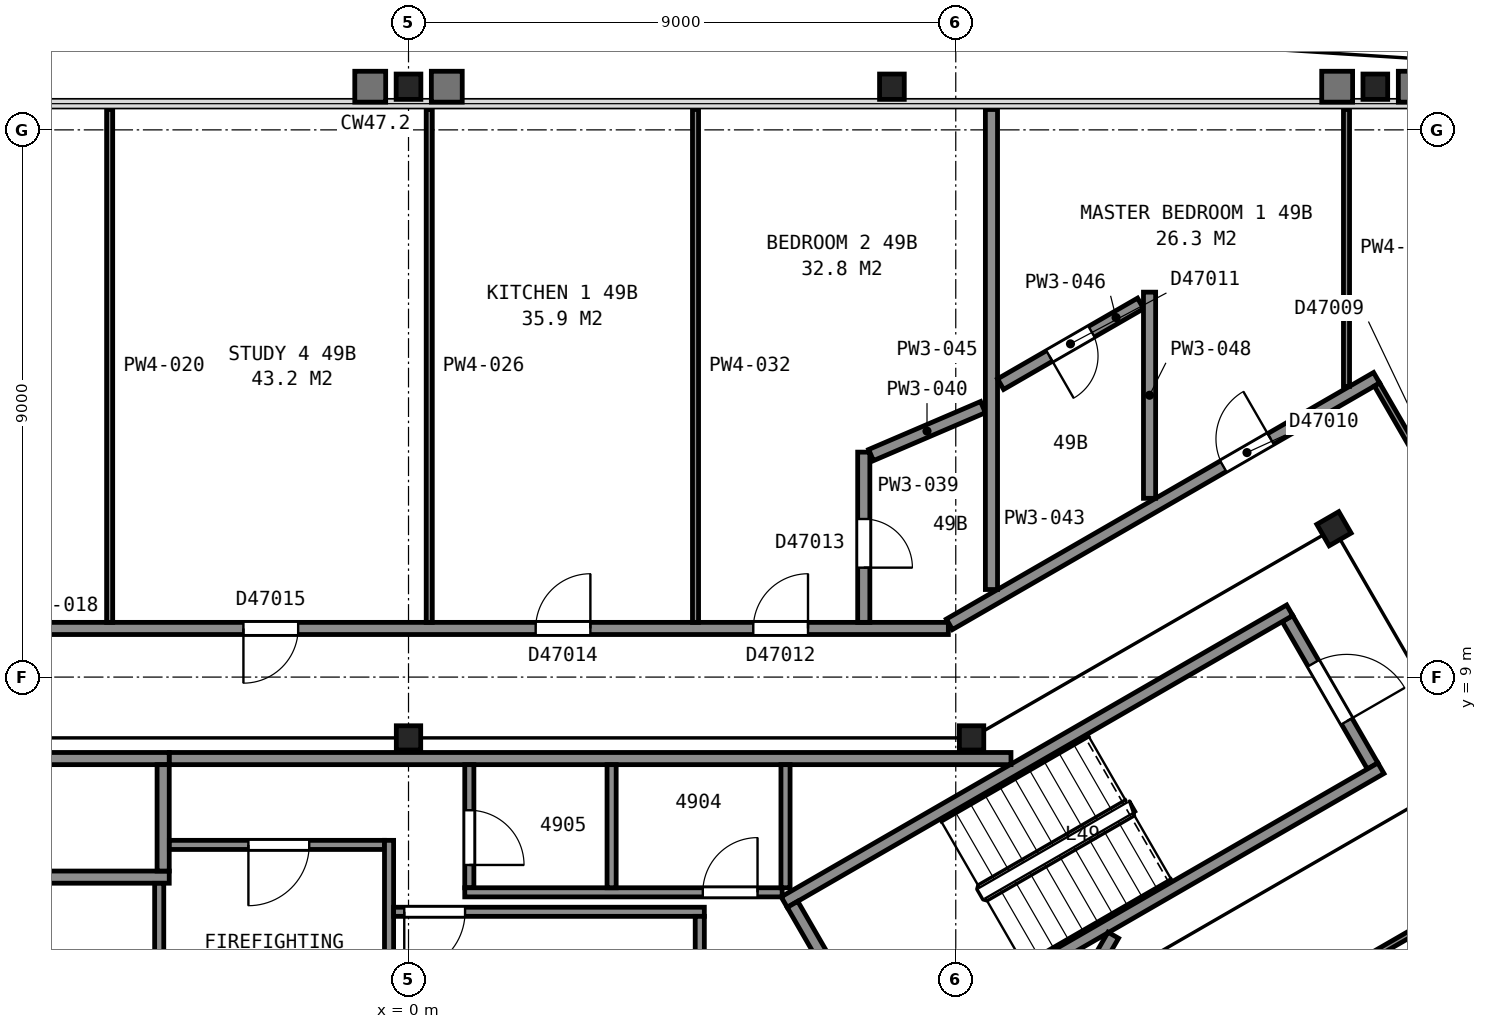
"""IFC4 building model, lengths in metres.
Left out: names, types, materials, properties, quantities, classifications, styles, units other than length and angle.
Written with IfcOpenShell. Run it as: python <this file> out.ifc"""

import sys

from ifc_helpers import new_model, si_unit, direction, frame, frame_2d, origin, origin_2d, place, context, subcontext, project, spatial, rectangle, i_section, extrude, element, fill, save


model = new_model("IFC4")
c1 = context("Model", 3, precision=1e-05, world=origin(), true_north=direction((0.0, 1.0)))
c2 = subcontext(c1, "Body", "Model", "MODEL_VIEW")
j1 = project(units=[si_unit("LENGTHUNIT", "METRE"), si_unit("PLANEANGLEUNIT", "RADIAN")], contexts=[c1])
p1 = place(None, origin())
s1 = spatial("IfcSite", under=j1, at=p1, CompositionType="ELEMENT")
p2 = place(p1, origin())
s2 = spatial("IfcBuilding", under=s1, at=p2, CompositionType="ELEMENT")
p3 = place(p2, frame((0.0, 0.0, 196.9)))
s3 = spatial("IfcBuildingStorey", under=s2, at=p3, CompositionType="ELEMENT", Elevation=196.9)
for number, where, z_axis, x_axis in (
    (1, (15.9, 18.71, 0.0), (0.0, 0.0, 1.0), (1.0, 0.0, 0.0)),
    (2, (7.95, 18.71, 0.0), (0.0, 0.0, 1.0), (1.0, 0.0, 0.0)),
    (3, (0.0, 18.71, 0.0), (0.0, 0.0, 1.0), (1.0, 0.0, 0.0)),
):
    element("IfcColumn", number, at=place(p3, frame(where, z_axis=z_axis, x_axis=x_axis)), inside=s3, PredefinedType="COLUMN", context=c2, shape_type="SweptSolid", body=[
        extrude(i_section(OverallWidth=0.406, OverallDepth=0.417, WebThickness=0.03, FlangeThickness=0.048, FilletRadius=0.015, at=origin_2d()), origin(), (0.0, 0.0, 1.0), 3.01),
    ])
p4 = place(p3, frame((15.22, 11.44, 0.0), z_axis=(0.0, 0.0, 1.0), x_axis=(0.5, -0.866025403784, 0.0)))
e4 = element("IfcColumn", 4, at=p4, inside=s3, PredefinedType="COLUMN", context=c2, shape_type="SweptSolid", body=[
    extrude(i_section(OverallWidth=0.406, OverallDepth=0.417, WebThickness=0.03, FlangeThickness=0.048, FilletRadius=0.015, at=origin_2d()), origin(), (0.0, 0.0, 1.0), 3.7),
])
for number, where, z_axis, x_axis in (
    (5, (9.26, 8.0, 0.0), (0.0, 0.0, 1.0), (1.0, 0.0, 0.0)),
    (6, (0.0, 8.0, 0.0), (0.0, 0.0, 1.0), (1.0, 0.0, 0.0)),
):
    element("IfcColumn", number, at=place(p3, frame(where, z_axis=z_axis, x_axis=x_axis)), inside=s3, PredefinedType="COLUMN", context=c2, shape_type="SweptSolid", body=[
        extrude(i_section(OverallWidth=0.401, OverallDepth=0.399, WebThickness=0.025, FlangeThickness=0.04, FilletRadius=0.015, at=origin_2d()), origin(), (0.0, 0.0, 1.0), 3.7),
    ])
p5 = place(p3, frame((15.855, 7.538, 0.0), z_axis=(0.0, 0.0, 1.0), x_axis=(-0.500049511043, 0.865996816683, 0.0)))
e7 = element("IfcWall", 7, at=p5, inside=s3, PredefinedType="PARTITIONING", context=c2, shape_type="SweptSolid", body=[
    extrude(rectangle(XDim=2.8, YDim=0.2, at=frame_2d((1.4, 0.0))), origin(), (0.0, 0.0, 1.0), 3.45),
])
p6 = place(p5, frame((0.85, 0.0, 0.0)))
e8 = element("IfcOpeningElement", 8, at=p6, cuts=e7, PredefinedType="OPENING", context=c2, shape_type="SweptSolid", body=[
    extrude(rectangle(XDim=1.1, YDim=2.1, at=frame_2d((0.55, 1.05))), frame((0.0, 0.11, 0.0), z_axis=(0.0, -1.0, 0.0), x_axis=(1.0, 0.0, 0.0)), (0.0, 0.0, 1.0), 0.22),
])
for number, where, z_axis, x_axis in (
    (9, (6.178, 5.299, 0.0), (0.0, 0.0, 1.0), (0.866, 0.5, 0.0)),
    (10, (7.678, 2.701, 0.0), (0.0, 0.0, 1.0), (0.866, 0.5, 0.0)),
):
    element("IfcWall", number, at=place(p3, frame(where, z_axis=z_axis, x_axis=x_axis)), inside=s3, PredefinedType="PARTITIONING", context=c2, shape_type="SweptSolid", body=[
        extrude(rectangle(XDim=9.6, YDim=0.2, at=frame_2d((4.8, 0.0))), origin(), (0.0, 0.0, 1.0), 3.45),
    ])
p7 = place(p3, frame((7.715, 2.838, 0.0), z_axis=(0.0, 0.0, 1.0), x_axis=(-0.500049511043, 0.865996816683, 0.0)))
e11 = element("IfcWall", 11, at=p7, inside=s3, PredefinedType="PARTITIONING", context=c2, shape_type="SweptSolid", body=[
    extrude(rectangle(XDim=2.8, YDim=0.2, at=frame_2d((1.4, 0.0))), origin(), (0.0, 0.0, 1.0), 3.45),
])
for number, where, z_axis, x_axis in (
    (12, (-6.285, 5.71, 0.0), (0.0, 0.0, 1.0), (1.0, 0.0, 0.0)),
    (13, (-6.285, 7.66, 0.0), (0.0, 0.0, 1.0), (1.0, 0.0, 0.0)),
):
    element("IfcWall", number, at=place(p3, frame(where, z_axis=z_axis, x_axis=x_axis)), inside=s3, PredefinedType="PARTITIONING", context=c2, shape_type="SweptSolid", body=[
        extrude(rectangle(XDim=2.35, YDim=0.2, at=frame_2d((1.175, 0.0))), origin(), (0.0, 0.0, 1.0), 3.7),
    ])
p8 = place(p3, frame((-4.035, 5.81, 0.0), z_axis=(0.0, 0.0, 1.0), x_axis=(0.0, 1.0, 0.0)))
e14 = element("IfcWall", 14, at=p8, inside=s3, PredefinedType="PARTITIONING", context=c2, shape_type="SweptSolid", body=[
    extrude(rectangle(XDim=1.75, YDim=0.2, at=frame_2d((0.875, 0.0))), origin(), (0.0, 0.0, 1.0), 3.7),
])
p9 = place(p3, frame((-4.1, 2.085, 0.0), z_axis=(0.0, 0.0, 1.0), x_axis=(0.0, 1.0, 0.0)))
e15 = element("IfcWall", 15, at=p9, inside=s3, PredefinedType="PARTITIONING", context=c2, shape_type="SweptSolid", body=[
    extrude(rectangle(XDim=3.523, YDim=0.15, at=frame_2d((1.761, 0.0))), origin(), (0.0, 0.0, 1.0), 3.45),
])
p10 = place(p3, frame((-3.933, 6.24, 0.0), z_axis=(0.0, 0.0, 1.0), x_axis=(1.0, 0.0, 0.0)))
e16 = element("IfcWall", 16, at=p10, inside=s3, PredefinedType="PARTITIONING", context=c2, shape_type="SweptSolid", body=[
    extrude(rectangle(XDim=3.538, YDim=0.15, at=frame_2d((1.769, 0.0))), origin(), (0.0, 0.0, 1.0), 3.45),
])
p11 = place(p10, frame((1.3, 0.0, 0.0)))
e17 = element("IfcOpeningElement", 17, at=p11, cuts=e16, PredefinedType="OPENING", context=c2, shape_type="SweptSolid", body=[
    extrude(rectangle(XDim=1.0, YDim=2.1, at=frame_2d((0.5, 1.05))), frame((0.0, 0.085, 0.0), z_axis=(0.0, -1.0, 0.0), x_axis=(1.0, 0.0, 0.0)), (0.0, 0.0, 1.0), 0.17),
])
p12 = place(p3, frame((-3.933, 7.66, 0.0), z_axis=(0.0, 0.0, 1.0), x_axis=(1.0, 0.0, 0.0)))
e18 = element("IfcWall", 18, at=p12, inside=s3, PredefinedType="PARTITIONING", context=c2, shape_type="SweptSolid", body=[
    extrude(rectangle(XDim=13.841, YDim=0.2, at=frame_2d((6.92, 0.0))), origin(), (0.0, 0.0, 1.0), 3.45),
])
p13 = place(p3, frame((-0.32, 2.252, 0.0), z_axis=(0.0, 0.0, 1.0), x_axis=(0.0, 1.0, 0.0)))
e19 = element("IfcWall", 19, at=p13, inside=s3, PredefinedType="PARTITIONING", context=c2, shape_type="SweptSolid", body=[
    extrude(rectangle(XDim=4.063, YDim=0.15, at=frame_2d((2.031, 0.0))), origin(), (0.0, 0.0, 1.0), 3.45),
])
p14 = place(p3, frame((-0.245, 5.14, 0.0), z_axis=(0.0, 0.0, 1.0), x_axis=(1.0, 0.0, 0.0)))
e20 = element("IfcWall", 20, at=p14, inside=s3, PredefinedType="PARTITIONING", context=c2, shape_type="SweptSolid", body=[
    extrude(rectangle(XDim=5.11, YDim=0.15, at=frame_2d((2.555, 0.0))), origin(), (0.0, 0.0, 1.0), 3.45),
])
p15 = place(p14, frame((0.175, 0.0, 0.0)))
e21 = element("IfcOpeningElement", 21, at=p15, cuts=e20, PredefinedType="OPENING", context=c2, shape_type="SweptSolid", body=[
    extrude(rectangle(XDim=1.0, YDim=2.1, at=frame_2d((0.5, 1.05))), frame((0.0, 0.085, 0.0), z_axis=(0.0, -1.0, 0.0), x_axis=(1.0, 0.0, 0.0)), (0.0, 0.0, 1.0), 0.17),
])
p16 = place(p3, frame((1.0, 7.56, 0.0), z_axis=(0.0, 0.0, 1.0), x_axis=(0.0, -1.0, 0.0)))
e22 = element("IfcWall", 22, at=p16, inside=s3, PredefinedType="PARTITIONING", context=c2, shape_type="SweptSolid", body=[
    extrude(rectangle(XDim=2.025, YDim=0.15, at=frame_2d((1.013, 0.0))), origin(), (0.0, 0.0, 1.0), 3.45),
])
p17 = place(p16, frame((0.75, 0.0, 0.0)))
e23 = element("IfcOpeningElement", 23, at=p17, cuts=e22, PredefinedType="OPENING", context=c2, shape_type="SweptSolid", body=[
    extrude(rectangle(XDim=0.9, YDim=2.1, at=frame_2d((0.45, 1.05))), frame((0.0, 0.085, 0.0), z_axis=(0.0, -1.0, 0.0), x_axis=(1.0, 0.0, 0.0)), (0.0, 0.0, 1.0), 0.17),
])
p18 = place(p3, frame((0.925, 5.46, 0.0), z_axis=(0.0, 0.0, 1.0), x_axis=(1.0, 0.0, 0.0)))
e24 = element("IfcWall", 24, at=p18, inside=s3, PredefinedType="PARTITIONING", context=c2, shape_type="SweptSolid", body=[
    extrude(rectangle(XDim=5.22, YDim=0.15, at=frame_2d((2.61, 0.0))), origin(), (0.0, 0.0, 1.0), 3.45),
])
p19 = place(p18, frame((3.915, 0.0, 0.0)))
e25 = element("IfcOpeningElement", 25, at=p19, cuts=e24, PredefinedType="OPENING", context=c2, shape_type="SweptSolid", body=[
    extrude(rectangle(XDim=0.9, YDim=2.1, at=frame_2d((0.45, 1.05))), frame((0.0, 0.085, 0.0), z_axis=(0.0, -1.0, 0.0), x_axis=(1.0, 0.0, 0.0)), (0.0, 0.0, 1.0), 0.17),
])
p20 = place(p3, frame((3.34, 5.535, 0.0), z_axis=(0.0, 0.0, 1.0), x_axis=(0.0, 1.0, 0.0)))
e26 = element("IfcWall", 26, at=p20, inside=s3, PredefinedType="PARTITIONING", context=c2, shape_type="SweptSolid", body=[
    extrude(rectangle(XDim=2.025, YDim=0.15, at=frame_2d((1.013, 0.0))), origin(), (0.0, 0.0, 1.0), 3.45),
])
p21 = place(p3, frame((4.79, 2.085, 0.0), z_axis=(0.0, 0.0, 1.0), x_axis=(0.0, 1.0, 0.0)))
e27 = element("IfcWall", 27, at=p21, inside=s3, PredefinedType="PARTITIONING", context=c2, shape_type="SweptSolid", body=[
    extrude(rectangle(XDim=2.98, YDim=0.15, at=frame_2d((1.49, 0.0))), origin(), (0.0, 0.0, 1.0), 3.45),
])
p22 = place(p3, frame((6.2, 5.535, 0.0), z_axis=(0.0, 0.0, 1.0), x_axis=(0.0, 1.0, 0.0)))
e28 = element("IfcWall", 28, at=p22, inside=s3, PredefinedType="PARTITIONING", context=c2, shape_type="SweptSolid", body=[
    extrude(rectangle(XDim=2.025, YDim=0.15, at=frame_2d((1.013, 0.0))), origin(), (0.0, 0.0, 1.0), 3.45),
])
p23 = place(p3, frame((9.803, 1.658, 0.0), z_axis=(0.0, 0.0, 1.0), x_axis=(0.499943114462, 0.866058244174, 0.0)))
e29 = element("IfcWall", 29, at=p23, inside=s3, PredefinedType="PARTITIONING", context=c2, shape_type="SweptSolid", body=[
    extrude(rectangle(XDim=3.576, YDim=0.2, at=frame_2d((1.788, 0.0))), origin(), (0.0, 0.0, 1.0), 3.45),
])
p24 = place(p3, frame((-8.828, 9.8, 0.0), z_axis=(0.0, 0.0, 1.0), x_axis=(1.0, 0.0, 0.0)))
e30 = element("IfcWall", 30, at=p24, inside=s3, PredefinedType="PARTITIONING", context=c2, shape_type="SweptSolid", body=[
    extrude(rectangle(XDim=17.706, YDim=0.2, at=frame_2d((8.853, 0.0))), origin(), (0.0, 0.0, 1.0), 2.362),
])
p25 = place(p24, frame((14.498, 0.0, 0.0)))
e31 = element("IfcOpeningElement", 31, at=p25, cuts=e30, PredefinedType="OPENING", context=c2, shape_type="SweptSolid", body=[
    extrude(rectangle(XDim=0.9, YDim=2.1, at=frame_2d((0.45, 1.05))), frame((0.0, 0.11, 0.0), z_axis=(0.0, -1.0, 0.0), x_axis=(1.0, 0.0, 0.0)), (0.0, 0.0, 1.0), 0.22),
])
p26 = place(p24, frame((10.919, 0.0, 0.0)))
e32 = element("IfcOpeningElement", 32, at=p26, cuts=e30, PredefinedType="OPENING", context=c2, shape_type="SweptSolid", body=[
    extrude(rectangle(XDim=0.9, YDim=2.1, at=frame_2d((0.45, 1.05))), frame((0.0, 0.11, 0.0), z_axis=(0.0, -1.0, 0.0), x_axis=(1.0, 0.0, 0.0)), (0.0, 0.0, 1.0), 0.22),
])
p27 = place(p24, frame((6.113, 0.0, 0.0)))
e33 = element("IfcOpeningElement", 33, at=p27, cuts=e30, PredefinedType="OPENING", context=c2, shape_type="SweptSolid", body=[
    extrude(rectangle(XDim=0.9, YDim=2.1, at=frame_2d((0.45, 1.05))), frame((0.0, 0.11, 0.0), z_axis=(0.0, -1.0, 0.0), x_axis=(1.0, 0.0, 0.0)), (0.0, 0.0, 1.0), 0.22),
])
for number, where, z_axis, x_axis in (
    (34, (-4.915, 9.9, 0.0), (0.0, 0.0, 1.0), (0.0, 1.0, 0.0)),
    (35, (0.341, 9.9, 0.0), (0.0, 0.0, 1.0), (0.0, 1.0, 0.0)),
    (36, (4.72, 9.9, 0.0), (0.0, 0.0, 1.0), (0.0, 1.0, 0.0)),
):
    element("IfcWall", number, at=place(p3, frame(where, z_axis=z_axis, x_axis=x_axis)), inside=s3, PredefinedType="PARTITIONING", context=c2, shape_type="SweptSolid", body=[
        extrude(rectangle(XDim=8.435, YDim=0.1, at=frame_2d((4.218, 0.0))), origin(), (0.0, 0.0, 1.0), 2.362),
    ])
p28 = place(p3, frame((7.487, 12.7, 0.0), z_axis=(0.0, 0.0, 1.0), x_axis=(0.0, -1.0, 0.0)))
e37 = element("IfcWall", 37, at=p28, inside=s3, PredefinedType="PARTITIONING", context=c2, shape_type="SweptSolid", body=[
    extrude(rectangle(XDim=2.8, YDim=0.2, at=frame_2d((1.4, 0.0))), origin(), (0.0, 0.0, 1.0), 2.362),
])
p29 = place(p28, frame((1.1, 0.0, 0.0)))
e38 = element("IfcOpeningElement", 38, at=p29, cuts=e37, PredefinedType="OPENING", context=c2, shape_type="SweptSolid", body=[
    extrude(rectangle(XDim=0.8, YDim=2.1, at=frame_2d((0.4, 1.05))), frame((0.0, 0.11, 0.0), z_axis=(0.0, -1.0, 0.0), x_axis=(1.0, 0.0, 0.0)), (0.0, 0.0, 1.0), 0.22),
])
p30 = place(p3, frame((7.606, 12.651, 0.0), z_axis=(0.0, 0.0, 1.0), x_axis=(0.919138725477, 0.39393400885, 0.0)))
e39 = element("IfcWall", 39, at=p30, inside=s3, PredefinedType="PARTITIONING", context=c2, shape_type="SweptSolid", body=[
    extrude(rectangle(XDim=2.003, YDim=0.2, at=frame_2d((1.001, 0.0))), origin(), (0.0, 0.0, 1.0), 2.362),
])
p31 = place(p3, frame((8.895, 9.867, 0.0), z_axis=(0.0, 0.0, 1.0), x_axis=(0.866079355551, 0.499906541154, 0.0)))
e40 = element("IfcWall", 40, at=p31, inside=s3, PredefinedType="PARTITIONING", context=c2, shape_type="SweptSolid", body=[
    extrude(rectangle(XDim=8.113, YDim=0.2, at=frame_2d((4.056, 0.0))), origin(), (0.0, 0.0, 1.0), 2.362),
])
p32 = place(p31, frame((5.201, 0.0, 0.0)))
e41 = element("IfcOpeningElement", 41, at=p32, cuts=e40, PredefinedType="OPENING", context=c2, shape_type="SweptSolid", body=[
    extrude(rectangle(XDim=0.9, YDim=2.1, at=frame_2d((0.45, 1.05))), frame((0.0, 0.11, 0.0), z_axis=(0.0, -1.0, 0.0), x_axis=(1.0, 0.0, 0.0)), (0.0, 0.0, 1.0), 0.22),
])
p33 = place(p3, frame((9.587, 10.44, 0.0), z_axis=(0.0, 0.0, 1.0), x_axis=(0.0, 1.0, 0.0)))
e42 = element("IfcWall", 42, at=p33, inside=s3, PredefinedType="PARTITIONING", context=c2, shape_type="SweptSolid", body=[
    extrude(rectangle(XDim=7.895, YDim=0.2, at=frame_2d((3.947, 0.0))), origin(), (0.0, 0.0, 1.0), 2.362),
])
p34 = place(p3, frame((12.04, 15.146, 0.0), z_axis=(0.0, 0.0, 1.0), x_axis=(-0.866206990114, -0.499685351273, 0.0)))
e43 = element("IfcWall", 43, at=p34, inside=s3, PredefinedType="PARTITIONING", context=c2, shape_type="SweptSolid", body=[
    extrude(rectangle(XDim=2.658, YDim=0.2, at=frame_2d((1.329, 0.0))), origin(), (0.0, 0.0, 1.0), 2.362),
])
p35 = place(p34, frame((0.932, 0.0, 0.0)))
e44 = element("IfcOpeningElement", 44, at=p35, cuts=e43, PredefinedType="OPENING", context=c2, shape_type="SweptSolid", body=[
    extrude(rectangle(XDim=0.8, YDim=2.1, at=frame_2d((0.4, 1.05))), frame((0.0, 0.11, 0.0), z_axis=(0.0, -1.0, 0.0), x_axis=(1.0, 0.0, 0.0)), (0.0, 0.0, 1.0), 0.22),
])
p36 = place(p3, frame((12.187, 11.94, 0.0), z_axis=(0.0, 0.0, 1.0), x_axis=(0.0, 1.0, 0.0)))
e45 = element("IfcWall", 45, at=p36, inside=s3, PredefinedType="PARTITIONING", context=c2, shape_type="SweptSolid", body=[
    extrude(rectangle(XDim=3.391, YDim=0.2, at=frame_2d((1.695, 0.0))), origin(), (0.0, 0.0, 1.0), 2.362),
])
p37 = place(p3, frame((20.023, 6.826, 0.0), z_axis=(0.0, 0.0, 1.0), x_axis=(-0.86608949446, -0.499888975259, 0.0)))
e46 = element("IfcWall", 46, at=p37, inside=s3, PredefinedType="PARTITIONING", context=c2, shape_type="SweptSolid", body=[
    extrude(rectangle(XDim=8.165, YDim=0.1, at=frame_2d((4.083, 0.0))), origin(), (0.0, 0.0, 1.0), 2.362),
])
p38 = place(p37, frame((6.8, 0.0, 0.0)))
e47 = element("IfcOpeningElement", 47, at=p38, cuts=e46, PredefinedType="OPENING", context=c2, shape_type="SweptSolid", body=[
    extrude(rectangle(XDim=0.9, YDim=2.1, at=frame_2d((0.45, 1.05))), frame((0.0, 0.06, 0.0), z_axis=(0.0, -1.0, 0.0), x_axis=(1.0, 0.0, 0.0)), (0.0, 0.0, 1.0), 0.12),
])
p39 = place(p37, frame((2.989, 0.0, 0.0)))
e48 = element("IfcOpeningElement", 48, at=p39, cuts=e46, PredefinedType="OPENING", context=c2, shape_type="SweptSolid", body=[
    extrude(rectangle(XDim=0.9, YDim=2.1, at=frame_2d((0.45, 1.05))), frame((0.0, 0.06, 0.0), z_axis=(0.0, -1.0, 0.0), x_axis=(1.0, 0.0, 0.0)), (0.0, 0.0, 1.0), 0.12),
])
p40 = place(p3, frame((15.426, 13.781, 0.0), z_axis=(0.0, 0.0, 1.0), x_axis=(0.0, 1.0, 0.0)))
e49 = element("IfcWall", 49, at=p40, inside=s3, PredefinedType="PARTITIONING", context=c2, shape_type="SweptSolid", body=[
    extrude(rectangle(XDim=4.554, YDim=0.1, at=frame_2d((2.277, 0.0))), origin(), (0.0, 0.0, 1.0), 2.362),
])
p41 = place(p3, frame((15.928, 13.812, 0.0), z_axis=(0.0, 0.0, 1.0), x_axis=(0.500422653123, -0.865781247337, 0.0)))
e50 = element("IfcWall", 50, at=p41, inside=s3, PredefinedType="PARTITIONING", context=c2, shape_type="SweptSolid", body=[
    extrude(rectangle(XDim=8.047, YDim=0.1, at=frame_2d((4.024, 0.0))), origin(), (0.0, 0.0, 1.0), 2.362),
])
p42 = place(p41, frame((3.4, 0.0, 0.0)))
e51 = element("IfcOpeningElement", 51, at=p42, cuts=e50, PredefinedType="OPENING", context=c2, shape_type="SweptSolid", body=[
    extrude(rectangle(XDim=1.2, YDim=2.1, at=frame_2d((0.6, 1.05))), frame((0.0, 0.06, 0.0), z_axis=(0.0, -1.0, 0.0), x_axis=(1.0, 0.0, 0.0)), (0.0, 0.0, 1.0), 0.12),
])
p43 = place(p6, origin())
e52 = element("IfcDoor", 52, at=p43, inside=s3, OperationType="SINGLE_SWING_LEFT", PredefinedType="DOOR", context=c2, shape_type="SweptSolid", body=[
    extrude(rectangle(XDim=1.1, YDim=2.1, at=frame_2d((0.55, 1.05))), frame((0.0, 0.025, 0.0), z_axis=(0.0, -1.0, 0.0), x_axis=(1.0, 0.0, 0.0)), (0.0, 0.0, 1.0), 0.05),
])
fill(e8, e52)
p44 = place(p11, origin())
e53 = element("IfcDoor", 53, at=p44, inside=s3, OperationType="SINGLE_SWING_LEFT", PredefinedType="DOOR", context=c2, shape_type="SweptSolid", body=[
    extrude(rectangle(XDim=1.0, YDim=2.1, at=frame_2d((0.5, 1.05))), frame((0.0, 0.025, 0.0), z_axis=(0.0, -1.0, 0.0), x_axis=(1.0, 0.0, 0.0)), (0.0, 0.0, 1.0), 0.05),
])
fill(e17, e53)
p45 = place(p15, origin())
e54 = element("IfcDoor", 54, at=p45, inside=s3, OperationType="SINGLE_SWING_LEFT", PredefinedType="DOOR", context=c2, shape_type="SweptSolid", body=[
    extrude(rectangle(XDim=1.0, YDim=2.1, at=frame_2d((0.5, 1.05))), frame((0.0, 0.025, 0.0), z_axis=(0.0, -1.0, 0.0), x_axis=(1.0, 0.0, 0.0)), (0.0, 0.0, 1.0), 0.05),
])
fill(e21, e54)
p46 = place(p17, origin())
e55 = element("IfcDoor", 55, at=p46, inside=s3, OperationType="SINGLE_SWING_RIGHT", PredefinedType="DOOR", context=c2, shape_type="SweptSolid", body=[
    extrude(rectangle(XDim=0.9, YDim=2.1, at=frame_2d((0.45, 1.05))), frame((0.0, 0.025, 0.0), z_axis=(0.0, -1.0, 0.0), x_axis=(1.0, 0.0, 0.0)), (0.0, 0.0, 1.0), 0.05),
])
fill(e23, e55)
p47 = place(p19, origin())
e56 = element("IfcDoor", 56, at=p47, inside=s3, OperationType="SINGLE_SWING_RIGHT", PredefinedType="DOOR", context=c2, shape_type="SweptSolid", body=[
    extrude(rectangle(XDim=0.9, YDim=2.1, at=frame_2d((0.45, 1.05))), frame((0.0, 0.025, 0.0), z_axis=(0.0, -1.0, 0.0), x_axis=(1.0, 0.0, 0.0)), (0.0, 0.0, 1.0), 0.05),
])
fill(e25, e56)
p48 = place(p25, origin())
e57 = element("IfcDoor", 57, at=p48, inside=s3, OperationType="SINGLE_SWING_RIGHT", PredefinedType="DOOR", context=c2, shape_type="SweptSolid", body=[
    extrude(rectangle(XDim=0.9, YDim=2.1, at=frame_2d((0.45, 1.05))), frame((0.0, 0.025, 0.0), z_axis=(0.0, -1.0, 0.0), x_axis=(1.0, 0.0, 0.0)), (0.0, 0.0, 1.0), 0.05),
])
fill(e31, e57)
p49 = place(p26, origin())
e58 = element("IfcDoor", 58, at=p49, inside=s3, OperationType="SINGLE_SWING_RIGHT", PredefinedType="DOOR", context=c2, shape_type="SweptSolid", body=[
    extrude(rectangle(XDim=0.9, YDim=2.1, at=frame_2d((0.45, 1.05))), frame((0.0, 0.025, 0.0), z_axis=(0.0, -1.0, 0.0), x_axis=(1.0, 0.0, 0.0)), (0.0, 0.0, 1.0), 0.05),
])
fill(e32, e58)
p50 = place(p27, origin())
e59 = element("IfcDoor", 59, at=p50, inside=s3, OperationType="SINGLE_SWING_LEFT", PredefinedType="DOOR", context=c2, shape_type="SweptSolid", body=[
    extrude(rectangle(XDim=0.9, YDim=2.1, at=frame_2d((0.45, 1.05))), frame((0.0, 0.025, 0.0), z_axis=(0.0, -1.0, 0.0), x_axis=(1.0, 0.0, 0.0)), (0.0, 0.0, 1.0), 0.05),
])
fill(e33, e59)
p51 = place(p29, origin())
e60 = element("IfcDoor", 60, at=p51, inside=s3, OperationType="SINGLE_SWING_RIGHT", PredefinedType="DOOR", context=c2, shape_type="SweptSolid", body=[
    extrude(rectangle(XDim=0.8, YDim=2.1, at=frame_2d((0.4, 1.05))), frame((0.0, 0.025, 0.0), z_axis=(0.0, -1.0, 0.0), x_axis=(1.0, 0.0, 0.0)), (0.0, 0.0, 1.0), 0.05),
])
fill(e38, e60)
p52 = place(p32, origin())
e61 = element("IfcDoor", 61, at=p52, inside=s3, OperationType="SINGLE_SWING_RIGHT", PredefinedType="DOOR", context=c2, shape_type="SweptSolid", body=[
    extrude(rectangle(XDim=0.9, YDim=2.1, at=frame_2d((0.45, 1.05))), frame((0.0, 0.025, 0.0), z_axis=(0.0, -1.0, 0.0), x_axis=(1.0, 0.0, 0.0)), (0.0, 0.0, 1.0), 0.05),
])
fill(e41, e61)
p53 = place(p35, origin())
e62 = element("IfcDoor", 62, at=p53, inside=s3, OperationType="SINGLE_SWING_RIGHT", PredefinedType="DOOR", context=c2, shape_type="SweptSolid", body=[
    extrude(rectangle(XDim=0.8, YDim=2.1, at=frame_2d((0.4, 1.05))), frame((0.0, 0.025, 0.0), z_axis=(0.0, -1.0, 0.0), x_axis=(1.0, 0.0, 0.0)), (0.0, 0.0, 1.0), 0.05),
])
fill(e44, e62)
save(model, sys.argv[1])
